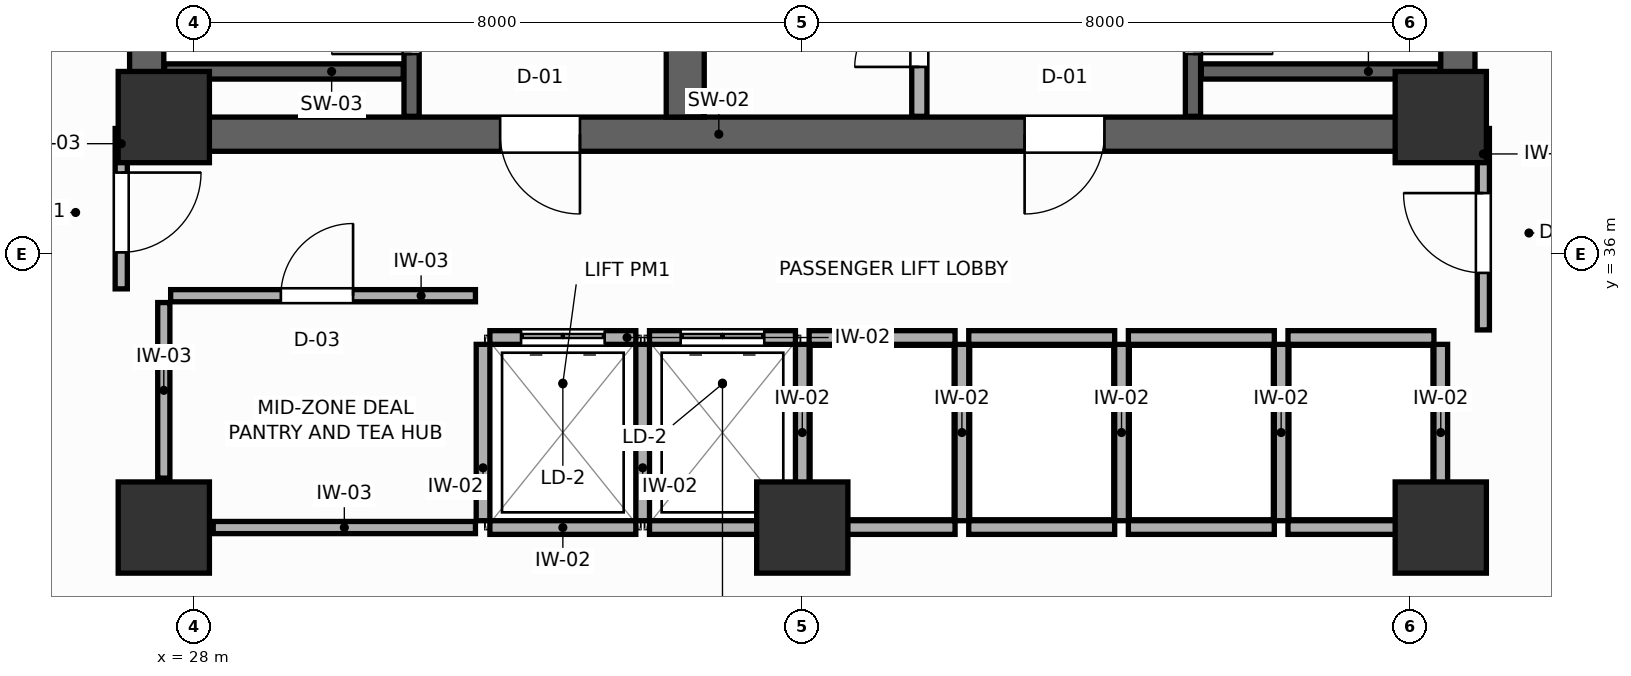
"""IFC4 building model, lengths in metres.
Left out: names, types, materials, properties, quantities, classifications, styles, units other than length and angle.
Written with IfcOpenShell. Run it as: python <this file> out.ifc"""

import sys

from ifc_helpers import new_model, si_unit, direction, frame, frame_2d, origin, origin_2d, place, context, subcontext, project, spatial, rectangle, extrude, source, transform, mapped, element, fill, save


model = new_model("IFC4")
c1 = context("Model", 3, precision=1e-05, world=origin(), true_north=direction((0.0, 1.0)))
c2 = subcontext(c1, "Body", "Model", "MODEL_VIEW")
j1 = project(units=[si_unit("LENGTHUNIT", "METRE"), si_unit("PLANEANGLEUNIT", "RADIAN")], contexts=[c1])
p1 = place(None, origin())
s1 = spatial("IfcSite", under=j1, at=p1, CompositionType="ELEMENT")
p2 = place(p1, origin())
s2 = spatial("IfcBuilding", under=s1, at=p2, CompositionType="ELEMENT")
p3 = place(p2, frame((0.0, 0.0, 131.4)))
s3 = spatial("IfcBuildingStorey", under=s2, at=p3, CompositionType="ELEMENT", Elevation=131.4)
p4 = place(p3, frame((27.15, 37.575, 0.0), z_axis=(0.0, 0.0, 1.0), x_axis=(1.0, 0.0, 0.0)))
e1 = element("IfcWall", 1, at=p4, inside=s3, PredefinedType="SHEAR", context=c2, shape_type="SweptSolid", body=[
    extrude(rectangle(XDim=17.7, YDim=0.45, at=frame_2d((8.85, 0.0))), origin(), (0.0, 0.0, 1.0), 4.8),
])
p5 = place(p4, frame((4.875, 0.0, 0.0)))
e2 = element("IfcOpeningElement", 2, at=p5, cuts=e1, PredefinedType="OPENING", context=c2, shape_type="SweptSolid", body=[
    extrude(rectangle(XDim=1.05, YDim=2.1, at=frame_2d((0.525, 1.05))), frame((0.0, 0.235, 0.0), z_axis=(0.0, -1.0, 0.0), x_axis=(1.0, 0.0, 0.0)), (0.0, 0.0, 1.0), 0.47),
])
p6 = place(p4, frame((11.775, 0.0, 0.0)))
e3 = element("IfcOpeningElement", 3, at=p6, cuts=e1, PredefinedType="OPENING", context=c2, shape_type="SweptSolid", body=[
    extrude(rectangle(XDim=1.05, YDim=2.1, at=frame_2d((0.525, 1.05))), frame((0.0, 0.235, 0.0), z_axis=(0.0, -1.0, 0.0), x_axis=(1.0, 0.0, 0.0)), (0.0, 0.0, 1.0), 0.47),
])
for number, where, z_axis, x_axis in (
    (4, (27.375, 37.8, 0.0), (0.0, 0.0, 1.0), (0.0, 1.0, 0.0)),
    (5, (44.625, 37.8, 0.0), (0.0, 0.0, 1.0), (0.0, 1.0, 0.0)),
):
    element("IfcWall", number, at=place(p3, frame(where, z_axis=z_axis, x_axis=x_axis)), inside=s3, PredefinedType="SHEAR", context=c2, shape_type="SweptSolid", body=[
        extrude(rectangle(XDim=9.0, YDim=0.45, at=frame_2d((4.5, 0.0))), origin(), (0.0, 0.0, 1.0), 4.8),
    ])
p7 = place(p3, frame((34.46, 37.8, 0.0), z_axis=(0.0, 0.0, 1.0), x_axis=(0.0, 1.0, 0.0)))
e6 = element("IfcWall", 6, at=p7, inside=s3, PredefinedType="SHEAR", context=c2, shape_type="SweptSolid", body=[
    extrude(rectangle(XDim=9.0, YDim=0.5, at=frame_2d((4.5, 0.0))), origin(), (0.0, 0.0, 1.0), 4.6),
])
m1 = source(origin(), c2, "Body", "SweptSolid", [
    extrude(rectangle(XDim=1.2, YDim=1.2, at=origin_2d()), origin(), (0.0, 0.0, 1.0), 4.8),
])
for number, where, z_axis, x_axis in (
    (7, (27.6, 37.8, 0.0), (0.0, 0.0, 1.0), (1.0, 0.0, 0.0)),
    (8, (44.4, 37.8, 0.0), (0.0, 0.0, 1.0), (1.0, 0.0, 0.0)),
    (9, (27.6, 32.4, 0.0), (0.0, 0.0, 1.0), (1.0, 0.0, 0.0)),
    (10, (44.4, 32.4, 0.0), (0.0, 0.0, 1.0), (1.0, 0.0, 0.0)),
    (11, (36.0, 32.4, 0.0), (0.0, 0.0, 1.0), (1.0, 0.0, 0.0)),
):
    element("IfcColumn", number, at=place(p3, frame(where, z_axis=z_axis, x_axis=x_axis)), inside=s3, PredefinedType="COLUMN", context=c2, shape_type="MappedRepresentation", body=[
        mapped(m1, transform((0.0, 0.0, 0.0), scale=1.0)),
    ])
p8 = place(p3, frame((30.86, 37.81, 0.0), z_axis=(0.0, 0.0, 1.0), x_axis=(0.0, 1.0, 0.0)))
e12 = element("IfcWall", 12, at=p8, inside=s3, PredefinedType="SHEAR", context=c2, shape_type="SweptSolid", body=[
    extrude(rectangle(XDim=8.98, YDim=0.2, at=frame_2d((4.49, 0.0))), origin(), (0.0, 0.0, 1.0), 4.8),
])
p9 = place(p8, frame((0.82, 0.0, 0.0)))
e13 = element("IfcOpeningElement", 13, at=p9, cuts=e12, PredefinedType="OPENING", context=c2, shape_type="SweptSolid", body=[
    extrude(rectangle(XDim=1.05, YDim=2.1, at=frame_2d((0.525, 1.05))), frame((0.0, 0.11, 0.0), z_axis=(0.0, -1.0, 0.0), x_axis=(1.0, 0.0, 0.0)), (0.0, 0.0, 1.0), 0.22),
])
p10 = place(p3, frame((27.61, 38.4, 0.0), z_axis=(0.0, 0.0, 1.0), x_axis=(1.0, 0.0, 0.0)))
e14 = element("IfcWall", 14, at=p10, inside=s3, PredefinedType="SHEAR", context=c2, shape_type="SweptSolid", body=[
    extrude(rectangle(XDim=3.14, YDim=0.2, at=frame_2d((1.57, 0.0))), origin(), (0.0, 0.0, 1.0), 4.8),
])
p11 = place(p3, frame((41.14, 37.81, 0.0), z_axis=(0.0, 0.0, 1.0), x_axis=(0.0, 1.0, 0.0)))
e15 = element("IfcWall", 15, at=p11, inside=s3, PredefinedType="SHEAR", context=c2, shape_type="SweptSolid", body=[
    extrude(rectangle(XDim=8.98, YDim=0.2, at=frame_2d((4.49, 0.0))), origin(), (0.0, 0.0, 1.0), 4.8),
])
p12 = place(p11, frame((0.82, 0.0, 0.0)))
e16 = element("IfcOpeningElement", 16, at=p12, cuts=e15, PredefinedType="OPENING", context=c2, shape_type="SweptSolid", body=[
    extrude(rectangle(XDim=1.05, YDim=2.1, at=frame_2d((0.525, 1.05))), frame((0.0, 0.11, 0.0), z_axis=(0.0, -1.0, 0.0), x_axis=(1.0, 0.0, 0.0)), (0.0, 0.0, 1.0), 0.22),
])
p13 = place(p3, frame((41.25, 38.4, 0.0), z_axis=(0.0, 0.0, 1.0), x_axis=(1.0, 0.0, 0.0)))
e17 = element("IfcWall", 17, at=p13, inside=s3, PredefinedType="SHEAR", context=c2, shape_type="SweptSolid", body=[
    extrude(rectangle(XDim=3.14, YDim=0.2, at=frame_2d((1.57, 0.0))), origin(), (0.0, 0.0, 1.0), 4.8),
])
p14 = place(p3, frame((37.54, 37.81, 0.0), z_axis=(0.0, 0.0, 1.0), x_axis=(0.0, 1.0, 0.0)))
e18 = element("IfcWall", 18, at=p14, inside=s3, PredefinedType="PARTITIONING", context=c2, shape_type="SweptSolid", body=[
    extrude(rectangle(XDim=8.98, YDim=0.2, at=frame_2d((4.49, 0.0))), origin(), (0.0, 0.0, 1.0), 4.6),
])
p15 = place(p14, frame((0.65, 0.0, 0.0)))
e19 = element("IfcOpeningElement", 19, at=p15, cuts=e18, PredefinedType="OPENING", context=c2, shape_type="SweptSolid", body=[
    extrude(rectangle(XDim=0.85, YDim=2.05, at=frame_2d((0.425, 1.025))), frame((0.0, 0.11, 0.0), z_axis=(0.0, -1.0, 0.0), x_axis=(1.0, 0.0, 0.0)), (0.0, 0.0, 1.0), 0.22),
])
p16 = place(p3, frame((31.89, 34.9, 0.0), z_axis=(0.0, 0.0, 1.0), x_axis=(1.0, 0.0, 0.0)))
e20 = element("IfcWall", 20, at=p16, inside=s3, PredefinedType="PARTITIONING", context=c2, shape_type="SweptSolid", body=[
    extrude(rectangle(XDim=1.92, YDim=0.18, at=frame_2d((0.96, 0.0))), origin(), (0.0, 0.0, 1.0), 4.6),
])
p17 = place(p16, frame((0.41, 0.0, 0.0)))
e21 = element("IfcOpeningElement", 21, at=p17, cuts=e20, PredefinedType="OPENING", context=c2, shape_type="SweptSolid", body=[
    extrude(rectangle(XDim=1.1, YDim=2.1, at=frame_2d((0.55, 1.05))), frame((0.0, 0.1, 0.0), z_axis=(0.0, -1.0, 0.0), x_axis=(1.0, 0.0, 0.0)), (0.0, 0.0, 1.0), 0.2),
])
p18 = place(p3, frame((31.89, 32.4, 0.0), z_axis=(0.0, 0.0, 1.0), x_axis=(1.0, 0.0, 0.0)))
e22 = element("IfcWall", 22, at=p18, inside=s3, PredefinedType="PARTITIONING", context=c2, shape_type="SweptSolid", body=[
    extrude(rectangle(XDim=1.92, YDim=0.18, at=frame_2d((0.96, 0.0))), origin(), (0.0, 0.0, 1.0), 2.57),
])
p19 = place(p3, frame((31.8, 32.49, 0.0), z_axis=(0.0, 0.0, 1.0), x_axis=(0.0, 1.0, 0.0)))
e23 = element("IfcWall", 23, at=p19, inside=s3, PredefinedType="PARTITIONING", context=c2, shape_type="SweptSolid", body=[
    extrude(rectangle(XDim=2.32, YDim=0.18, at=frame_2d((1.16, 0.0))), origin(), (0.0, 0.0, 1.0), 4.6),
])
p20 = place(p3, frame((33.99, 34.9, 0.0), z_axis=(0.0, 0.0, 1.0), x_axis=(1.0, 0.0, 0.0)))
e24 = element("IfcWall", 24, at=p20, inside=s3, PredefinedType="PARTITIONING", context=c2, shape_type="SweptSolid", body=[
    extrude(rectangle(XDim=1.92, YDim=0.18, at=frame_2d((0.96, 0.0))), origin(), (0.0, 0.0, 1.0), 4.6),
])
p21 = place(p20, frame((0.41, 0.0, 0.0)))
e25 = element("IfcOpeningElement", 25, at=p21, cuts=e24, PredefinedType="OPENING", context=c2, shape_type="SweptSolid", body=[
    extrude(rectangle(XDim=1.1, YDim=2.1, at=frame_2d((0.55, 1.05))), frame((0.0, 0.1, 0.0), z_axis=(0.0, -1.0, 0.0), x_axis=(1.0, 0.0, 0.0)), (0.0, 0.0, 1.0), 0.2),
])
p22 = place(p3, frame((33.99, 32.4, 0.0), z_axis=(0.0, 0.0, 1.0), x_axis=(1.0, 0.0, 0.0)))
e26 = element("IfcWall", 26, at=p22, inside=s3, PredefinedType="PARTITIONING", context=c2, shape_type="SweptSolid", body=[
    extrude(rectangle(XDim=1.92, YDim=0.18, at=frame_2d((0.96, 0.0))), origin(), (0.0, 0.0, 1.0), 2.57),
])
p23 = place(p3, frame((33.9, 32.49, 0.0), z_axis=(0.0, 0.0, 1.0), x_axis=(0.0, 1.0, 0.0)))
e27 = element("IfcWall", 27, at=p23, inside=s3, PredefinedType="PARTITIONING", context=c2, shape_type="SweptSolid", body=[
    extrude(rectangle(XDim=2.32, YDim=0.18, at=frame_2d((1.16, 0.0))), origin(), (0.0, 0.0, 1.0), 4.6),
])
p24 = place(p3, frame((36.09, 34.9, 0.0), z_axis=(0.0, 0.0, 1.0), x_axis=(1.0, 0.0, 0.0)))
e28 = element("IfcWall", 28, at=p24, inside=s3, PredefinedType="PARTITIONING", context=c2, shape_type="SweptSolid", body=[
    extrude(rectangle(XDim=1.92, YDim=0.18, at=frame_2d((0.96, 0.0))), origin(), (0.0, 0.0, 1.0), 4.6),
])
p25 = place(p3, frame((36.09, 32.4, 0.0), z_axis=(0.0, 0.0, 1.0), x_axis=(1.0, 0.0, 0.0)))
e29 = element("IfcWall", 29, at=p25, inside=s3, PredefinedType="PARTITIONING", context=c2, shape_type="SweptSolid", body=[
    extrude(rectangle(XDim=1.92, YDim=0.18, at=frame_2d((0.96, 0.0))), origin(), (0.0, 0.0, 1.0), 2.57),
])
p26 = place(p3, frame((36.0, 32.49, 0.0), z_axis=(0.0, 0.0, 1.0), x_axis=(0.0, 1.0, 0.0)))
e30 = element("IfcWall", 30, at=p26, inside=s3, PredefinedType="PARTITIONING", context=c2, shape_type="SweptSolid", body=[
    extrude(rectangle(XDim=2.32, YDim=0.18, at=frame_2d((1.16, 0.0))), origin(), (0.0, 0.0, 1.0), 4.6),
])
p27 = place(p3, frame((38.19, 34.9, 0.0), z_axis=(0.0, 0.0, 1.0), x_axis=(1.0, 0.0, 0.0)))
e31 = element("IfcWall", 31, at=p27, inside=s3, PredefinedType="PARTITIONING", context=c2, shape_type="SweptSolid", body=[
    extrude(rectangle(XDim=1.92, YDim=0.18, at=frame_2d((0.96, 0.0))), origin(), (0.0, 0.0, 1.0), 4.6),
])
p28 = place(p3, frame((38.19, 32.4, 0.0), z_axis=(0.0, 0.0, 1.0), x_axis=(1.0, 0.0, 0.0)))
e32 = element("IfcWall", 32, at=p28, inside=s3, PredefinedType="PARTITIONING", context=c2, shape_type="SweptSolid", body=[
    extrude(rectangle(XDim=1.92, YDim=0.18, at=frame_2d((0.96, 0.0))), origin(), (0.0, 0.0, 1.0), 2.57),
])
p29 = place(p3, frame((38.1, 32.49, 0.0), z_axis=(0.0, 0.0, 1.0), x_axis=(0.0, 1.0, 0.0)))
e33 = element("IfcWall", 33, at=p29, inside=s3, PredefinedType="PARTITIONING", context=c2, shape_type="SweptSolid", body=[
    extrude(rectangle(XDim=2.32, YDim=0.18, at=frame_2d((1.16, 0.0))), origin(), (0.0, 0.0, 1.0), 4.6),
])
p30 = place(p3, frame((40.29, 34.9, 0.0), z_axis=(0.0, 0.0, 1.0), x_axis=(1.0, 0.0, 0.0)))
e34 = element("IfcWall", 34, at=p30, inside=s3, PredefinedType="PARTITIONING", context=c2, shape_type="SweptSolid", body=[
    extrude(rectangle(XDim=1.92, YDim=0.18, at=frame_2d((0.96, 0.0))), origin(), (0.0, 0.0, 1.0), 4.6),
])
p31 = place(p3, frame((40.29, 32.4, 0.0), z_axis=(0.0, 0.0, 1.0), x_axis=(1.0, 0.0, 0.0)))
e35 = element("IfcWall", 35, at=p31, inside=s3, PredefinedType="PARTITIONING", context=c2, shape_type="SweptSolid", body=[
    extrude(rectangle(XDim=1.92, YDim=0.18, at=frame_2d((0.96, 0.0))), origin(), (0.0, 0.0, 1.0), 2.57),
])
p32 = place(p3, frame((40.2, 32.49, 0.0), z_axis=(0.0, 0.0, 1.0), x_axis=(0.0, 1.0, 0.0)))
e36 = element("IfcWall", 36, at=p32, inside=s3, PredefinedType="PARTITIONING", context=c2, shape_type="SweptSolid", body=[
    extrude(rectangle(XDim=2.32, YDim=0.18, at=frame_2d((1.16, 0.0))), origin(), (0.0, 0.0, 1.0), 4.6),
])
p33 = place(p3, frame((42.39, 34.9, 0.0), z_axis=(0.0, 0.0, 1.0), x_axis=(1.0, 0.0, 0.0)))
e37 = element("IfcWall", 37, at=p33, inside=s3, PredefinedType="PARTITIONING", context=c2, shape_type="SweptSolid", body=[
    extrude(rectangle(XDim=1.92, YDim=0.18, at=frame_2d((0.96, 0.0))), origin(), (0.0, 0.0, 1.0), 4.6),
])
p34 = place(p3, frame((42.39, 32.4, 0.0), z_axis=(0.0, 0.0, 1.0), x_axis=(1.0, 0.0, 0.0)))
e38 = element("IfcWall", 38, at=p34, inside=s3, PredefinedType="PARTITIONING", context=c2, shape_type="SweptSolid", body=[
    extrude(rectangle(XDim=1.92, YDim=0.18, at=frame_2d((0.96, 0.0))), origin(), (0.0, 0.0, 1.0), 2.57),
])
for number, where, z_axis, x_axis in (
    (39, (42.3, 32.49, 0.0), (0.0, 0.0, 1.0), (0.0, 1.0, 0.0)),
    (40, (44.4, 32.49, 0.0), (0.0, 0.0, 1.0), (0.0, 1.0, 0.0)),
):
    element("IfcWall", number, at=place(p3, frame(where, z_axis=z_axis, x_axis=x_axis)), inside=s3, PredefinedType="PARTITIONING", context=c2, shape_type="SweptSolid", body=[
        extrude(rectangle(XDim=2.32, YDim=0.18, at=frame_2d((1.16, 0.0))), origin(), (0.0, 0.0, 1.0), 4.6),
    ])
p35 = place(p3, frame((28.25, 32.4, 0.0), z_axis=(0.0, 0.0, 1.0), x_axis=(1.0, 0.0, 0.0)))
e41 = element("IfcWall", 41, at=p35, inside=s3, PredefinedType="PARTITIONING", context=c2, shape_type="SweptSolid", body=[
    extrude(rectangle(XDim=3.45, YDim=0.16, at=frame_2d((1.725, 0.0))), origin(), (0.0, 0.0, 1.0), 2.57),
])
p36 = place(p3, frame((27.6, 33.05, 0.0), z_axis=(0.0, 0.0, 1.0), x_axis=(0.0, 1.0, 0.0)))
e42 = element("IfcWall", 42, at=p36, inside=s3, PredefinedType="PARTITIONING", context=c2, shape_type="SweptSolid", body=[
    extrude(rectangle(XDim=2.31, YDim=0.16, at=frame_2d((1.155, 0.0))), origin(), (0.0, 0.0, 1.0), 4.6),
])
p37 = place(p3, frame((27.69, 35.45, 0.0), z_axis=(0.0, 0.0, 1.0), x_axis=(1.0, 0.0, 0.0)))
e43 = element("IfcWall", 43, at=p37, inside=s3, PredefinedType="PARTITIONING", context=c2, shape_type="SweptSolid", body=[
    extrude(rectangle(XDim=4.01, YDim=0.16, at=frame_2d((2.005, 0.0))), origin(), (0.0, 0.0, 1.0), 4.6),
])
p38 = place(p37, frame((1.45, 0.0, 0.0)))
e44 = element("IfcOpeningElement", 44, at=p38, cuts=e43, PredefinedType="OPENING", context=c2, shape_type="SweptSolid", body=[
    extrude(rectangle(XDim=0.95, YDim=2.05, at=frame_2d((0.475, 1.025))), frame((0.0, 0.09, 0.0), z_axis=(0.0, -1.0, 0.0), x_axis=(1.0, 0.0, 0.0)), (0.0, 0.0, 1.0), 0.18),
])
p39 = place(p3, frame((27.04, 35.54, 0.0), z_axis=(0.0, 0.0, 1.0), x_axis=(0.0, 1.0, 0.0)))
e45 = element("IfcWall", 45, at=p39, inside=s3, PredefinedType="PARTITIONING", context=c2, shape_type="SweptSolid", body=[
    extrude(rectangle(XDim=2.11, YDim=0.16, at=frame_2d((1.055, 0.0))), origin(), (0.0, 0.0, 1.0), 4.6),
])
p40 = place(p39, frame((0.48, 0.0, 0.0)))
e46 = element("IfcOpeningElement", 46, at=p40, cuts=e45, PredefinedType="OPENING", context=c2, shape_type="SweptSolid", body=[
    extrude(rectangle(XDim=1.05, YDim=2.1, at=frame_2d((0.525, 1.05))), frame((0.0, 0.09, 0.0), z_axis=(0.0, -1.0, 0.0), x_axis=(1.0, 0.0, 0.0)), (0.0, 0.0, 1.0), 0.18),
])
p41 = place(p3, frame((44.96, 35.0, 0.0), z_axis=(0.0, 0.0, 1.0), x_axis=(0.0, 1.0, 0.0)))
e47 = element("IfcWall", 47, at=p41, inside=s3, PredefinedType="PARTITIONING", context=c2, shape_type="SweptSolid", body=[
    extrude(rectangle(XDim=2.65, YDim=0.16, at=frame_2d((1.325, 0.0))), origin(), (0.0, 0.0, 1.0), 4.6),
])
p42 = place(p41, frame((0.75, 0.0, 0.0)))
e48 = element("IfcOpeningElement", 48, at=p42, cuts=e47, PredefinedType="OPENING", context=c2, shape_type="SweptSolid", body=[
    extrude(rectangle(XDim=1.05, YDim=2.1, at=frame_2d((0.525, 1.05))), frame((0.0, 0.09, 0.0), z_axis=(0.0, -1.0, 0.0), x_axis=(1.0, 0.0, 0.0)), (0.0, 0.0, 1.0), 0.18),
])
p43 = place(p9, origin())
e49 = element("IfcDoor", 49, at=p43, inside=s3, OperationType="SINGLE_SWING_LEFT", PredefinedType="DOOR", context=c2, shape_type="SweptSolid", body=[
    extrude(rectangle(XDim=1.05, YDim=2.1, at=frame_2d((0.525, 1.05))), frame((0.0, 0.025, 0.0), z_axis=(0.0, -1.0, 0.0), x_axis=(1.0, 0.0, 0.0)), (0.0, 0.0, 1.0), 0.05),
])
fill(e13, e49)
p44 = place(p12, frame((1.05, 0.0, 0.0), z_axis=(0.0, 0.0, 1.0), x_axis=(-1.0, 0.0, 0.0)))
e50 = element("IfcDoor", 50, at=p44, inside=s3, OperationType="SINGLE_SWING_RIGHT", PredefinedType="DOOR", context=c2, shape_type="SweptSolid", body=[
    extrude(rectangle(XDim=1.05, YDim=2.1, at=frame_2d((0.525, 1.05))), frame((0.0, 0.025, 0.0), z_axis=(0.0, -1.0, 0.0), x_axis=(1.0, 0.0, 0.0)), (0.0, 0.0, 1.0), 0.05),
])
fill(e16, e50)
p45 = place(p15, origin())
e51 = element("IfcDoor", 51, at=p45, inside=s3, OperationType="SINGLE_SWING_LEFT", PredefinedType="DOOR", context=c2, shape_type="SweptSolid", body=[
    extrude(rectangle(XDim=0.85, YDim=2.05, at=frame_2d((0.425, 1.025))), frame((0.0, 0.025, 0.0), z_axis=(0.0, -1.0, 0.0), x_axis=(1.0, 0.0, 0.0)), (0.0, 0.0, 1.0), 0.05),
])
fill(e19, e51)
p46 = place(p17, origin())
e52 = element("IfcDoor", 52, at=p46, inside=s3, OperationType="DOUBLE_DOOR_SLIDING", PredefinedType="DOOR", context=c2, shape_type="SweptSolid", body=[
    extrude(rectangle(XDim=1.1, YDim=2.1, at=frame_2d((0.55, 1.05))), frame((0.0, 0.025, 0.0), z_axis=(0.0, -1.0, 0.0), x_axis=(1.0, 0.0, 0.0)), (0.0, 0.0, 1.0), 0.05),
])
fill(e21, e52)
p47 = place(p21, origin())
e53 = element("IfcDoor", 53, at=p47, inside=s3, OperationType="DOUBLE_DOOR_SLIDING", PredefinedType="DOOR", context=c2, shape_type="SweptSolid", body=[
    extrude(rectangle(XDim=1.1, YDim=2.1, at=frame_2d((0.55, 1.05))), frame((0.0, 0.025, 0.0), z_axis=(0.0, -1.0, 0.0), x_axis=(1.0, 0.0, 0.0)), (0.0, 0.0, 1.0), 0.05),
])
fill(e25, e53)
p48 = place(p38, origin())
e54 = element("IfcDoor", 54, at=p48, inside=s3, OperationType="SINGLE_SWING_RIGHT", PredefinedType="DOOR", context=c2, shape_type="SweptSolid", body=[
    extrude(rectangle(XDim=0.95, YDim=2.05, at=frame_2d((0.475, 1.025))), frame((0.0, 0.025, 0.0), z_axis=(0.0, -1.0, 0.0), x_axis=(1.0, 0.0, 0.0)), (0.0, 0.0, 1.0), 0.05),
])
fill(e44, e54)
p49 = place(p40, frame((1.05, 0.0, 0.0), z_axis=(0.0, 0.0, 1.0), x_axis=(-1.0, 0.0, 0.0)))
e55 = element("IfcDoor", 55, at=p49, inside=s3, OperationType="SINGLE_SWING_LEFT", PredefinedType="DOOR", context=c2, shape_type="SweptSolid", body=[
    extrude(rectangle(XDim=1.05, YDim=2.1, at=frame_2d((0.525, 1.05))), frame((0.0, 0.025, 0.0), z_axis=(0.0, -1.0, 0.0), x_axis=(1.0, 0.0, 0.0)), (0.0, 0.0, 1.0), 0.05),
])
fill(e46, e55)
p50 = place(p42, origin())
e56 = element("IfcDoor", 56, at=p50, inside=s3, OperationType="SINGLE_SWING_RIGHT", PredefinedType="DOOR", context=c2, shape_type="SweptSolid", body=[
    extrude(rectangle(XDim=1.05, YDim=2.1, at=frame_2d((0.525, 1.05))), frame((0.0, 0.025, 0.0), z_axis=(0.0, -1.0, 0.0), x_axis=(1.0, 0.0, 0.0)), (0.0, 0.0, 1.0), 0.05),
])
fill(e48, e56)
p51 = place(p5, frame((1.05, 0.0, 0.0), z_axis=(0.0, 0.0, 1.0), x_axis=(-1.0, 0.0, 0.0)))
e57 = element("IfcDoor", 57, at=p51, inside=s3, OperationType="SINGLE_SWING_LEFT", PredefinedType="DOOR", context=c2, shape_type="SweptSolid", body=[
    extrude(rectangle(XDim=1.05, YDim=2.1, at=frame_2d((0.525, 1.05))), frame((0.0, 0.025, 0.0), z_axis=(0.0, -1.0, 0.0), x_axis=(1.0, 0.0, 0.0)), (0.0, 0.0, 1.0), 0.05),
])
fill(e2, e57)
p52 = place(p6, frame((1.05, 0.0, 0.0), z_axis=(0.0, 0.0, 1.0), x_axis=(-1.0, 0.0, 0.0)))
e58 = element("IfcDoor", 58, at=p52, inside=s3, OperationType="SINGLE_SWING_RIGHT", PredefinedType="DOOR", context=c2, shape_type="SweptSolid", body=[
    extrude(rectangle(XDim=1.05, YDim=2.1, at=frame_2d((0.525, 1.05))), frame((0.0, 0.025, 0.0), z_axis=(0.0, -1.0, 0.0), x_axis=(1.0, 0.0, 0.0)), (0.0, 0.0, 1.0), 0.05),
])
fill(e3, e58)
save(model, sys.argv[1])
